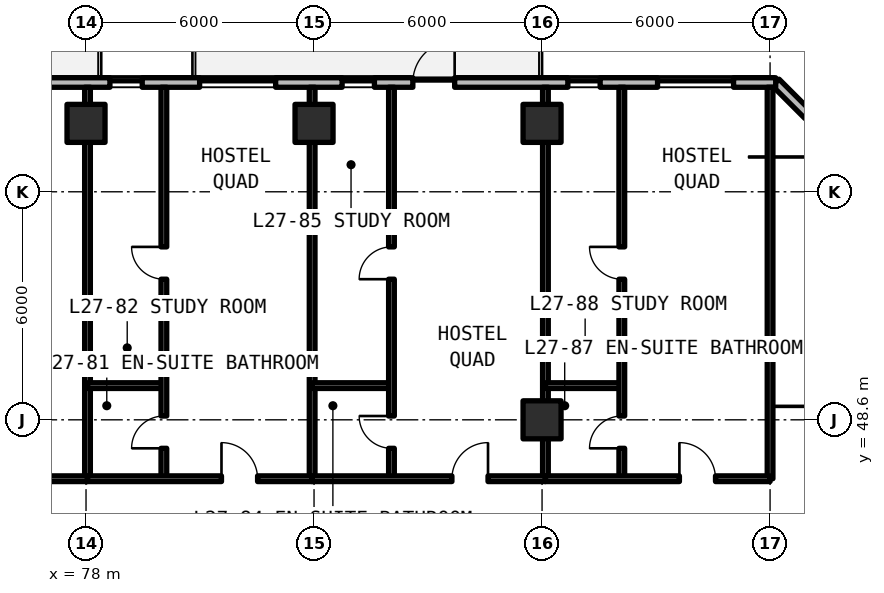
"""IFC4 building model, lengths in metres.
Left out: names, types, materials, properties, quantities, classifications, styles, units other than length and angle.
Written with IfcOpenShell. Run it as: python <this file> out.ifc"""

import sys

from ifc_helpers import new_model, si_unit, direction, frame, frame_2d, origin, origin_2d, place, context, subcontext, project, spatial, rectangle, extrude, element, fill, save


model = new_model("IFC4")
c1 = context("Model", 3, precision=1e-05, world=origin(), true_north=direction((0.0, 1.0)))
c2 = subcontext(c1, "Body", "Model", "MODEL_VIEW")
j1 = project(units=[si_unit("LENGTHUNIT", "METRE"), si_unit("PLANEANGLEUNIT", "RADIAN")], contexts=[c1])
p1 = place(None, origin())
s1 = spatial("IfcSite", under=j1, at=p1, CompositionType="ELEMENT")
p2 = place(p1, origin())
s2 = spatial("IfcBuilding", under=s1, at=p2, CompositionType="ELEMENT")
p3 = place(p2, frame((0.0, 0.0, 98.67)))
s3 = spatial("IfcBuildingStorey", under=s2, at=p3, CompositionType="ELEMENT", Elevation=98.67)
for number, where, z_axis, x_axis in (
    (1, (90.0, 48.6, 0.0), (0.0, 0.0, 1.0), (1.0, 0.0, 0.0)),
    (2, (78.0, 56.4, 0.0), (0.0, 0.0, 1.0), (1.0, 0.0, 0.0)),
    (3, (84.0, 56.4, 0.0), (0.0, 0.0, 1.0), (1.0, 0.0, 0.0)),
    (4, (90.0, 56.4, 0.0), (0.0, 0.0, 1.0), (1.0, 0.0, 0.0)),
):
    element("IfcColumn", number, at=place(p3, frame(where, z_axis=z_axis, x_axis=x_axis)), inside=s3, PredefinedType="COLUMN", context=c2, shape_type="SweptSolid", body=[
        extrude(rectangle(XDim=1.0, YDim=1.0, at=origin_2d()), origin(), (0.0, 0.0, 1.0), 3.3),
    ])
p4 = place(p3, frame((100.275, 53.348, 0.0), z_axis=(0.0, 0.0, 1.0), x_axis=(-0.70708586489, 0.707127696864, 0.0)))
e5 = element("IfcWall", 5, at=p4, inside=s3, PredefinedType="SOLIDWALL", context=c2, shape_type="SweptSolid", body=[
    extrude(rectangle(XDim=5.836, YDim=0.25, at=frame_2d((2.918, 0.0))), origin(), (0.0, 0.0, 1.0), 3.08),
])
p5 = place(p4, frame((1.218, 0.0, 0.78)))
e6 = element("IfcOpeningElement", 6, at=p5, cuts=e5, PredefinedType="OPENING", context=c2, shape_type="SweptSolid", body=[
    extrude(rectangle(XDim=3.4, YDim=1.66, at=frame_2d((1.7, 0.83))), frame((0.0, 0.135, 0.0), z_axis=(0.0, -1.0, 0.0), x_axis=(1.0, 0.0, 0.0)), (0.0, 0.0, 1.0), 0.27),
])
p6 = place(p3, frame((96.148, 57.475, 0.0), z_axis=(0.0, 0.0, 1.0), x_axis=(-1.0, 0.0, 0.0)))
e7 = element("IfcWall", 7, at=p6, inside=s3, PredefinedType="SOLIDWALL", context=c2, shape_type="SweptSolid", body=[
    extrude(rectangle(XDim=44.023, YDim=0.25, at=frame_2d((22.012, 0.0))), origin(), (0.0, 0.0, 1.0), 3.08),
])
p7 = place(p6, frame((32.398, 0.0, 0.0)))
e8 = element("IfcOpeningElement", 8, at=p7, cuts=e7, PredefinedType="OPENING", context=c2, shape_type="SweptSolid", body=[
    extrude(rectangle(XDim=1.1, YDim=2.15, at=frame_2d((0.55, 1.075))), frame((0.0, 0.135, 0.0), z_axis=(0.0, -1.0, 0.0), x_axis=(1.0, 0.0, 0.0)), (0.0, 0.0, 1.0), 0.27),
])
p8 = place(p6, frame((20.548, 0.0, 0.0)))
e9 = element("IfcOpeningElement", 9, at=p8, cuts=e7, PredefinedType="OPENING", context=c2, shape_type="SweptSolid", body=[
    extrude(rectangle(XDim=1.1, YDim=2.15, at=frame_2d((0.55, 1.075))), frame((0.0, 0.135, 0.0), z_axis=(0.0, -1.0, 0.0), x_axis=(1.0, 0.0, 0.0)), (0.0, 0.0, 1.0), 0.27),
])
p9 = place(p6, frame((8.448, 0.0, 0.0)))
e10 = element("IfcOpeningElement", 10, at=p9, cuts=e7, PredefinedType="OPENING", context=c2, shape_type="SweptSolid", body=[
    extrude(rectangle(XDim=1.1, YDim=2.15, at=frame_2d((0.55, 1.075))), frame((0.0, 0.135, 0.0), z_axis=(0.0, -1.0, 0.0), x_axis=(1.0, 0.0, 0.0)), (0.0, 0.0, 1.0), 0.27),
])
p10 = place(p6, frame((39.277, 0.0, 0.78)))
e11 = element("IfcOpeningElement", 11, at=p10, cuts=e7, PredefinedType="OPENING", context=c2, shape_type="SweptSolid", body=[
    extrude(rectangle(XDim=2.0, YDim=1.66, at=frame_2d((1.0, 0.83))), frame((0.0, 0.135, 0.0), z_axis=(0.0, -1.0, 0.0), x_axis=(1.0, 0.0, 0.0)), (0.0, 0.0, 1.0), 0.27),
])
p11 = place(p6, frame((34.622, 0.0, 0.78)))
e12 = element("IfcOpeningElement", 12, at=p11, cuts=e7, PredefinedType="OPENING", context=c2, shape_type="SweptSolid", body=[
    extrude(rectangle(XDim=0.85, YDim=1.65, at=frame_2d((0.425, 0.825))), frame((0.0, 0.135, 0.0), z_axis=(0.0, -1.0, 0.0), x_axis=(1.0, 0.0, 0.0)), (0.0, 0.0, 1.0), 0.27),
])
p12 = place(p6, frame((26.431, 0.0, 0.78)))
e13 = element("IfcOpeningElement", 13, at=p12, cuts=e7, PredefinedType="OPENING", context=c2, shape_type="SweptSolid", body=[
    extrude(rectangle(XDim=2.0, YDim=1.66, at=frame_2d((1.0, 0.83))), frame((0.0, 0.135, 0.0), z_axis=(0.0, -1.0, 0.0), x_axis=(1.0, 0.0, 0.0)), (0.0, 0.0, 1.0), 0.27),
])
p13 = place(p6, frame((22.757, 0.0, 0.78)))
e14 = element("IfcOpeningElement", 14, at=p13, cuts=e7, PredefinedType="OPENING", context=c2, shape_type="SweptSolid", body=[
    extrude(rectangle(XDim=0.85, YDim=1.65, at=frame_2d((0.425, 0.825))), frame((0.0, 0.135, 0.0), z_axis=(0.0, -1.0, 0.0), x_axis=(1.0, 0.0, 0.0)), (0.0, 0.0, 1.0), 0.27),
])
p14 = place(p6, frame((16.669, 0.0, 0.78)))
e15 = element("IfcOpeningElement", 15, at=p14, cuts=e7, PredefinedType="OPENING", context=c2, shape_type="SweptSolid", body=[
    extrude(rectangle(XDim=0.85, YDim=1.65, at=frame_2d((0.425, 0.825))), frame((0.0, 0.135, 0.0), z_axis=(0.0, -1.0, 0.0), x_axis=(1.0, 0.0, 0.0)), (0.0, 0.0, 1.0), 0.27),
])
p15 = place(p6, frame((13.159, 0.0, 0.78)))
e16 = element("IfcOpeningElement", 16, at=p15, cuts=e7, PredefinedType="OPENING", context=c2, shape_type="SweptSolid", body=[
    extrude(rectangle(XDim=2.0, YDim=1.66, at=frame_2d((1.0, 0.83))), frame((0.0, 0.135, 0.0), z_axis=(0.0, -1.0, 0.0), x_axis=(1.0, 0.0, 0.0)), (0.0, 0.0, 1.0), 0.27),
])
p16 = place(p6, frame((10.56, 0.0, 0.78)))
e17 = element("IfcOpeningElement", 17, at=p16, cuts=e7, PredefinedType="OPENING", context=c2, shape_type="SweptSolid", body=[
    extrude(rectangle(XDim=0.85, YDim=1.65, at=frame_2d((0.425, 0.825))), frame((0.0, 0.135, 0.0), z_axis=(0.0, -1.0, 0.0), x_axis=(1.0, 0.0, 0.0)), (0.0, 0.0, 1.0), 0.27),
])
p17 = place(p6, frame((4.619, 0.0, 0.78)))
e18 = element("IfcOpeningElement", 18, at=p17, cuts=e7, PredefinedType="OPENING", context=c2, shape_type="SweptSolid", body=[
    extrude(rectangle(XDim=0.85, YDim=1.65, at=frame_2d((0.425, 0.825))), frame((0.0, 0.135, 0.0), z_axis=(0.0, -1.0, 0.0), x_axis=(1.0, 0.0, 0.0)), (0.0, 0.0, 1.0), 0.27),
])
p18 = place(p6, frame((1.109, 0.0, 0.78)))
e19 = element("IfcOpeningElement", 19, at=p18, cuts=e7, PredefinedType="OPENING", context=c2, shape_type="SweptSolid", body=[
    extrude(rectangle(XDim=2.0, YDim=1.66, at=frame_2d((1.0, 0.83))), frame((0.0, 0.135, 0.0), z_axis=(0.0, -1.0, 0.0), x_axis=(1.0, 0.0, 0.0)), (0.0, 0.0, 1.0), 0.27),
])
for number, where, z_axis, x_axis in (
    (20, (96.0, 47.05, 0.0), (0.0, 0.0, 1.0), (0.0, 1.0, 0.0)),
    (21, (78.039, 47.05, 0.0), (0.0, 0.0, 1.0), (0.0, 1.0, 0.0)),
):
    element("IfcWall", number, at=place(p3, frame(where, z_axis=z_axis, x_axis=x_axis)), inside=s3, PredefinedType="SOLIDWALL", context=c2, shape_type="SweptSolid", body=[
        extrude(rectangle(XDim=10.3, YDim=0.15, at=frame_2d((5.15, 0.0))), origin(), (0.0, 0.0, 1.0), 2.35),
    ])
p19 = place(p3, frame((71.673, 47.05, 0.0), z_axis=(0.0, 0.0, 1.0), x_axis=(1.0, 0.0, 0.0)))
e22 = element("IfcWall", 22, at=p19, inside=s3, PredefinedType="SOLIDWALL", context=c2, shape_type="SweptSolid", body=[
    extrude(rectangle(XDim=6.366, YDim=0.15, at=frame_2d((3.183, 0.0))), origin(), (0.0, 0.0, 1.0), 2.35),
])
p20 = place(p19, frame((3.872, 0.0, 0.0)))
e23 = element("IfcOpeningElement", 23, at=p20, cuts=e22, PredefinedType="OPENING", context=c2, shape_type="SweptSolid", body=[
    extrude(rectangle(XDim=0.95, YDim=2.15, at=frame_2d((0.475, 1.075))), frame((0.0, 0.085, 0.0), z_axis=(0.0, -1.0, 0.0), x_axis=(1.0, 0.0, 0.0)), (0.0, 0.0, 1.0), 0.17),
])
p21 = place(p3, frame((83.95, 47.05, 0.0), z_axis=(0.0, 0.0, 1.0), x_axis=(0.0, 1.0, 0.0)))
e24 = element("IfcWall", 24, at=p21, inside=s3, PredefinedType="SOLIDWALL", context=c2, shape_type="SweptSolid", body=[
    extrude(rectangle(XDim=10.3, YDim=0.15, at=frame_2d((5.15, 0.0))), origin(), (0.0, 0.0, 1.0), 2.35),
])
p22 = place(p3, frame((78.039, 49.5, 0.0), z_axis=(0.0, 0.0, 1.0), x_axis=(1.0, 0.0, 0.0)))
e25 = element("IfcWall", 25, at=p22, inside=s3, PredefinedType="PARTITIONING", context=c2, shape_type="SweptSolid", body=[
    extrude(rectangle(XDim=2.01, YDim=0.15, at=frame_2d((1.005, 0.0))), origin(), (0.0, 0.0, 1.0), 2.35),
])
p23 = place(p3, frame((80.049, 47.05, 0.0), z_axis=(0.0, 0.0, 1.0), x_axis=(0.0, 1.0, 0.0)))
e26 = element("IfcWall", 26, at=p23, inside=s3, PredefinedType="PARTITIONING", context=c2, shape_type="SweptSolid", body=[
    extrude(rectangle(XDim=10.3, YDim=0.15, at=frame_2d((5.15, 0.0))), origin(), (0.0, 0.0, 1.0), 2.35),
])
p24 = place(p23, frame((0.8, 0.0, 0.0)))
e27 = element("IfcOpeningElement", 27, at=p24, cuts=e26, PredefinedType="OPENING", context=c2, shape_type="SweptSolid", body=[
    extrude(rectangle(XDim=0.85, YDim=2.1, at=frame_2d((0.425, 1.05))), frame((0.0, 0.085, 0.0), z_axis=(0.0, -1.0, 0.0), x_axis=(1.0, 0.0, 0.0)), (0.0, 0.0, 1.0), 0.17),
])
p25 = place(p23, frame((5.25, 0.0, 0.0)))
e28 = element("IfcOpeningElement", 28, at=p25, cuts=e26, PredefinedType="OPENING", context=c2, shape_type="SweptSolid", body=[
    extrude(rectangle(XDim=0.85, YDim=2.1, at=frame_2d((0.425, 1.05))), frame((0.0, 0.085, 0.0), z_axis=(0.0, -1.0, 0.0), x_axis=(1.0, 0.0, 0.0)), (0.0, 0.0, 1.0), 0.17),
])
p26 = place(p3, frame((78.039, 47.05, 0.0), z_axis=(0.0, 0.0, 1.0), x_axis=(1.0, 0.0, 0.0)))
e29 = element("IfcWall", 29, at=p26, inside=s3, PredefinedType="SOLIDWALL", context=c2, shape_type="SweptSolid", body=[
    extrude(rectangle(XDim=5.911, YDim=0.15, at=frame_2d((2.956, 0.0))), origin(), (0.0, 0.0, 1.0), 2.35),
])
p27 = place(p26, frame((3.526, 0.0, 0.0)))
e30 = element("IfcOpeningElement", 30, at=p27, cuts=e29, PredefinedType="OPENING", context=c2, shape_type="SweptSolid", body=[
    extrude(rectangle(XDim=0.95, YDim=2.15, at=frame_2d((0.475, 1.075))), frame((0.0, 0.085, 0.0), z_axis=(0.0, -1.0, 0.0), x_axis=(1.0, 0.0, 0.0)), (0.0, 0.0, 1.0), 0.17),
])
p28 = place(p3, frame((90.089, 47.05, 0.0), z_axis=(0.0, 0.0, 1.0), x_axis=(0.0, 1.0, 0.0)))
e31 = element("IfcWall", 31, at=p28, inside=s3, PredefinedType="SOLIDWALL", context=c2, shape_type="SweptSolid", body=[
    extrude(rectangle(XDim=10.3, YDim=0.15, at=frame_2d((5.15, 0.0))), origin(), (0.0, 0.0, 1.0), 2.35),
])
p29 = place(p3, frame((83.95, 49.5, 0.0), z_axis=(0.0, 0.0, 1.0), x_axis=(1.0, 0.0, 0.0)))
e32 = element("IfcWall", 32, at=p29, inside=s3, PredefinedType="PARTITIONING", context=c2, shape_type="SweptSolid", body=[
    extrude(rectangle(XDim=2.087, YDim=0.15, at=frame_2d((1.043, 0.0))), origin(), (0.0, 0.0, 1.0), 2.35),
])
p30 = place(p3, frame((86.037, 47.05, 0.0), z_axis=(0.0, 0.0, 1.0), x_axis=(0.0, 1.0, 0.0)))
e33 = element("IfcWall", 33, at=p30, inside=s3, PredefinedType="PARTITIONING", context=c2, shape_type="SweptSolid", body=[
    extrude(rectangle(XDim=10.3, YDim=0.15, at=frame_2d((5.15, 0.0))), origin(), (0.0, 0.0, 1.0), 2.35),
])
p31 = place(p30, frame((0.8, 0.0, 0.0)))
e34 = element("IfcOpeningElement", 34, at=p31, cuts=e33, PredefinedType="OPENING", context=c2, shape_type="SweptSolid", body=[
    extrude(rectangle(XDim=0.85, YDim=2.1, at=frame_2d((0.425, 1.05))), frame((0.0, 0.085, 0.0), z_axis=(0.0, -1.0, 0.0), x_axis=(1.0, 0.0, 0.0)), (0.0, 0.0, 1.0), 0.17),
])
p32 = place(p30, frame((5.25, 0.0, 0.0)))
e35 = element("IfcOpeningElement", 35, at=p32, cuts=e33, PredefinedType="OPENING", context=c2, shape_type="SweptSolid", body=[
    extrude(rectangle(XDim=0.85, YDim=2.1, at=frame_2d((0.425, 1.05))), frame((0.0, 0.085, 0.0), z_axis=(0.0, -1.0, 0.0), x_axis=(1.0, 0.0, 0.0)), (0.0, 0.0, 1.0), 0.17),
])
p33 = place(p3, frame((83.95, 47.05, 0.0), z_axis=(0.0, 0.0, 1.0), x_axis=(1.0, 0.0, 0.0)))
e36 = element("IfcWall", 36, at=p33, inside=s3, PredefinedType="SOLIDWALL", context=c2, shape_type="SweptSolid", body=[
    extrude(rectangle(XDim=6.139, YDim=0.15, at=frame_2d((3.069, 0.0))), origin(), (0.0, 0.0, 1.0), 2.35),
])
p34 = place(p33, frame((3.678, 0.0, 0.0)))
e37 = element("IfcOpeningElement", 37, at=p34, cuts=e36, PredefinedType="OPENING", context=c2, shape_type="SweptSolid", body=[
    extrude(rectangle(XDim=0.95, YDim=2.15, at=frame_2d((0.475, 1.075))), frame((0.0, 0.085, 0.0), z_axis=(0.0, -1.0, 0.0), x_axis=(1.0, 0.0, 0.0)), (0.0, 0.0, 1.0), 0.17),
])
p35 = place(p3, frame((90.089, 49.5, 0.0), z_axis=(0.0, 0.0, 1.0), x_axis=(1.0, 0.0, 0.0)))
e38 = element("IfcWall", 38, at=p35, inside=s3, PredefinedType="PARTITIONING", context=c2, shape_type="SweptSolid", body=[
    extrude(rectangle(XDim=2.01, YDim=0.15, at=frame_2d((1.005, 0.0))), origin(), (0.0, 0.0, 1.0), 2.35),
])
p36 = place(p3, frame((92.099, 47.05, 0.0), z_axis=(0.0, 0.0, 1.0), x_axis=(0.0, 1.0, 0.0)))
e39 = element("IfcWall", 39, at=p36, inside=s3, PredefinedType="PARTITIONING", context=c2, shape_type="SweptSolid", body=[
    extrude(rectangle(XDim=10.3, YDim=0.15, at=frame_2d((5.15, 0.0))), origin(), (0.0, 0.0, 1.0), 2.35),
])
p37 = place(p36, frame((0.8, 0.0, 0.0)))
e40 = element("IfcOpeningElement", 40, at=p37, cuts=e39, PredefinedType="OPENING", context=c2, shape_type="SweptSolid", body=[
    extrude(rectangle(XDim=0.85, YDim=2.1, at=frame_2d((0.425, 1.05))), frame((0.0, 0.085, 0.0), z_axis=(0.0, -1.0, 0.0), x_axis=(1.0, 0.0, 0.0)), (0.0, 0.0, 1.0), 0.17),
])
p38 = place(p36, frame((5.25, 0.0, 0.0)))
e41 = element("IfcOpeningElement", 41, at=p38, cuts=e39, PredefinedType="OPENING", context=c2, shape_type="SweptSolid", body=[
    extrude(rectangle(XDim=0.85, YDim=2.1, at=frame_2d((0.425, 1.05))), frame((0.0, 0.085, 0.0), z_axis=(0.0, -1.0, 0.0), x_axis=(1.0, 0.0, 0.0)), (0.0, 0.0, 1.0), 0.17),
])
p39 = place(p3, frame((90.089, 47.05, 0.0), z_axis=(0.0, 0.0, 1.0), x_axis=(1.0, 0.0, 0.0)))
e42 = element("IfcWall", 42, at=p39, inside=s3, PredefinedType="SOLIDWALL", context=c2, shape_type="SweptSolid", body=[
    extrude(rectangle(XDim=5.911, YDim=0.15, at=frame_2d((2.956, 0.0))), origin(), (0.0, 0.0, 1.0), 2.35),
])
p40 = place(p39, frame((3.525, 0.0, 0.0)))
e43 = element("IfcOpeningElement", 43, at=p40, cuts=e42, PredefinedType="OPENING", context=c2, shape_type="SweptSolid", body=[
    extrude(rectangle(XDim=0.95, YDim=2.15, at=frame_2d((0.475, 1.075))), frame((0.0, 0.085, 0.0), z_axis=(0.0, -1.0, 0.0), x_axis=(1.0, 0.0, 0.0)), (0.0, 0.0, 1.0), 0.17),
])
p41 = place(p9, frame((1.1, 0.0, 0.0), z_axis=(0.0, 0.0, 1.0), x_axis=(-1.0, 0.0, 0.0)))
e44 = element("IfcDoor", 44, at=p41, inside=s3, OperationType="SINGLE_SWING_RIGHT", PredefinedType="DOOR", context=c2, shape_type="SweptSolid", body=[
    extrude(rectangle(XDim=1.1, YDim=2.15, at=frame_2d((0.55, 1.075))), frame((0.0, 0.025, 0.0), z_axis=(0.0, -1.0, 0.0), x_axis=(1.0, 0.0, 0.0)), (0.0, 0.0, 1.0), 0.05),
])
fill(e10, e44)
p42 = place(p14, origin())
e45 = element("IfcWindow", 45, at=p42, inside=s3, PartitioningType="SINGLE_PANEL", PredefinedType="WINDOW", context=c2, shape_type="SweptSolid", body=[
    extrude(rectangle(XDim=0.85, YDim=1.65, at=frame_2d((0.425, 0.825))), frame((0.0, 0.03, 0.0), z_axis=(0.0, -1.0, 0.0), x_axis=(1.0, 0.0, 0.0)), (0.0, 0.0, 1.0), 0.06),
])
fill(e15, e45)
p43 = place(p15, origin())
e46 = element("IfcWindow", 46, at=p43, inside=s3, PartitioningType="SINGLE_PANEL", PredefinedType="WINDOW", context=c2, shape_type="SweptSolid", body=[
    extrude(rectangle(XDim=2.0, YDim=1.66, at=frame_2d((1.0, 0.83))), frame((0.0, 0.03, 0.0), z_axis=(0.0, -1.0, 0.0), x_axis=(1.0, 0.0, 0.0)), (0.0, 0.0, 1.0), 0.06),
])
fill(e16, e46)
p44 = place(p16, origin())
e47 = element("IfcWindow", 47, at=p44, inside=s3, PartitioningType="SINGLE_PANEL", PredefinedType="WINDOW", context=c2, shape_type="SweptSolid", body=[
    extrude(rectangle(XDim=0.85, YDim=1.65, at=frame_2d((0.425, 0.825))), frame((0.0, 0.03, 0.0), z_axis=(0.0, -1.0, 0.0), x_axis=(1.0, 0.0, 0.0)), (0.0, 0.0, 1.0), 0.06),
])
fill(e17, e47)
p45 = place(p17, origin())
e48 = element("IfcWindow", 48, at=p45, inside=s3, PartitioningType="SINGLE_PANEL", PredefinedType="WINDOW", context=c2, shape_type="SweptSolid", body=[
    extrude(rectangle(XDim=0.85, YDim=1.65, at=frame_2d((0.425, 0.825))), frame((0.0, 0.03, 0.0), z_axis=(0.0, -1.0, 0.0), x_axis=(1.0, 0.0, 0.0)), (0.0, 0.0, 1.0), 0.06),
])
fill(e18, e48)
p46 = place(p18, origin())
e49 = element("IfcWindow", 49, at=p46, inside=s3, PartitioningType="SINGLE_PANEL", PredefinedType="WINDOW", context=c2, shape_type="SweptSolid", body=[
    extrude(rectangle(XDim=2.0, YDim=1.66, at=frame_2d((1.0, 0.83))), frame((0.0, 0.03, 0.0), z_axis=(0.0, -1.0, 0.0), x_axis=(1.0, 0.0, 0.0)), (0.0, 0.0, 1.0), 0.06),
])
fill(e19, e49)
p47 = place(p24, origin())
e50 = element("IfcDoor", 50, at=p47, inside=s3, OperationType="SINGLE_SWING_LEFT", PredefinedType="DOOR", context=c2, shape_type="SweptSolid", body=[
    extrude(rectangle(XDim=0.85, YDim=2.1, at=frame_2d((0.425, 1.05))), frame((0.0, 0.025, 0.0), z_axis=(0.0, -1.0, 0.0), x_axis=(1.0, 0.0, 0.0)), (0.0, 0.0, 1.0), 0.05),
])
fill(e27, e50)
p48 = place(p25, origin())
e51 = element("IfcDoor", 51, at=p48, inside=s3, OperationType="SINGLE_SWING_RIGHT", PredefinedType="DOOR", context=c2, shape_type="SweptSolid", body=[
    extrude(rectangle(XDim=0.85, YDim=2.1, at=frame_2d((0.425, 1.05))), frame((0.0, 0.025, 0.0), z_axis=(0.0, -1.0, 0.0), x_axis=(1.0, 0.0, 0.0)), (0.0, 0.0, 1.0), 0.05),
])
fill(e28, e51)
p49 = place(p27, origin())
e52 = element("IfcDoor", 52, at=p49, inside=s3, OperationType="SINGLE_SWING_LEFT", PredefinedType="DOOR", context=c2, shape_type="SweptSolid", body=[
    extrude(rectangle(XDim=0.95, YDim=2.15, at=frame_2d((0.475, 1.075))), frame((0.0, 0.025, 0.0), z_axis=(0.0, -1.0, 0.0), x_axis=(1.0, 0.0, 0.0)), (0.0, 0.0, 1.0), 0.05),
])
fill(e30, e52)
p50 = place(p31, origin())
e53 = element("IfcDoor", 53, at=p50, inside=s3, OperationType="SINGLE_SWING_RIGHT", PredefinedType="DOOR", context=c2, shape_type="SweptSolid", body=[
    extrude(rectangle(XDim=0.85, YDim=2.1, at=frame_2d((0.425, 1.05))), frame((0.0, 0.025, 0.0), z_axis=(0.0, -1.0, 0.0), x_axis=(1.0, 0.0, 0.0)), (0.0, 0.0, 1.0), 0.05),
])
fill(e34, e53)
p51 = place(p32, origin())
e54 = element("IfcDoor", 54, at=p51, inside=s3, OperationType="SINGLE_SWING_LEFT", PredefinedType="DOOR", context=c2, shape_type="SweptSolid", body=[
    extrude(rectangle(XDim=0.85, YDim=2.1, at=frame_2d((0.425, 1.05))), frame((0.0, 0.025, 0.0), z_axis=(0.0, -1.0, 0.0), x_axis=(1.0, 0.0, 0.0)), (0.0, 0.0, 1.0), 0.05),
])
fill(e35, e54)
p52 = place(p34, origin())
e55 = element("IfcDoor", 55, at=p52, inside=s3, OperationType="SINGLE_SWING_RIGHT", PredefinedType="DOOR", context=c2, shape_type="SweptSolid", body=[
    extrude(rectangle(XDim=0.95, YDim=2.15, at=frame_2d((0.475, 1.075))), frame((0.0, 0.025, 0.0), z_axis=(0.0, -1.0, 0.0), x_axis=(1.0, 0.0, 0.0)), (0.0, 0.0, 1.0), 0.05),
])
fill(e37, e55)
p53 = place(p37, origin())
e56 = element("IfcDoor", 56, at=p53, inside=s3, OperationType="SINGLE_SWING_LEFT", PredefinedType="DOOR", context=c2, shape_type="SweptSolid", body=[
    extrude(rectangle(XDim=0.85, YDim=2.1, at=frame_2d((0.425, 1.05))), frame((0.0, 0.025, 0.0), z_axis=(0.0, -1.0, 0.0), x_axis=(1.0, 0.0, 0.0)), (0.0, 0.0, 1.0), 0.05),
])
fill(e40, e56)
p54 = place(p38, origin())
e57 = element("IfcDoor", 57, at=p54, inside=s3, OperationType="SINGLE_SWING_RIGHT", PredefinedType="DOOR", context=c2, shape_type="SweptSolid", body=[
    extrude(rectangle(XDim=0.85, YDim=2.1, at=frame_2d((0.425, 1.05))), frame((0.0, 0.025, 0.0), z_axis=(0.0, -1.0, 0.0), x_axis=(1.0, 0.0, 0.0)), (0.0, 0.0, 1.0), 0.05),
])
fill(e41, e57)
p55 = place(p40, origin())
e58 = element("IfcDoor", 58, at=p55, inside=s3, OperationType="SINGLE_SWING_LEFT", PredefinedType="DOOR", context=c2, shape_type="SweptSolid", body=[
    extrude(rectangle(XDim=0.95, YDim=2.15, at=frame_2d((0.475, 1.075))), frame((0.0, 0.025, 0.0), z_axis=(0.0, -1.0, 0.0), x_axis=(1.0, 0.0, 0.0)), (0.0, 0.0, 1.0), 0.05),
])
fill(e43, e58)
save(model, sys.argv[1])
